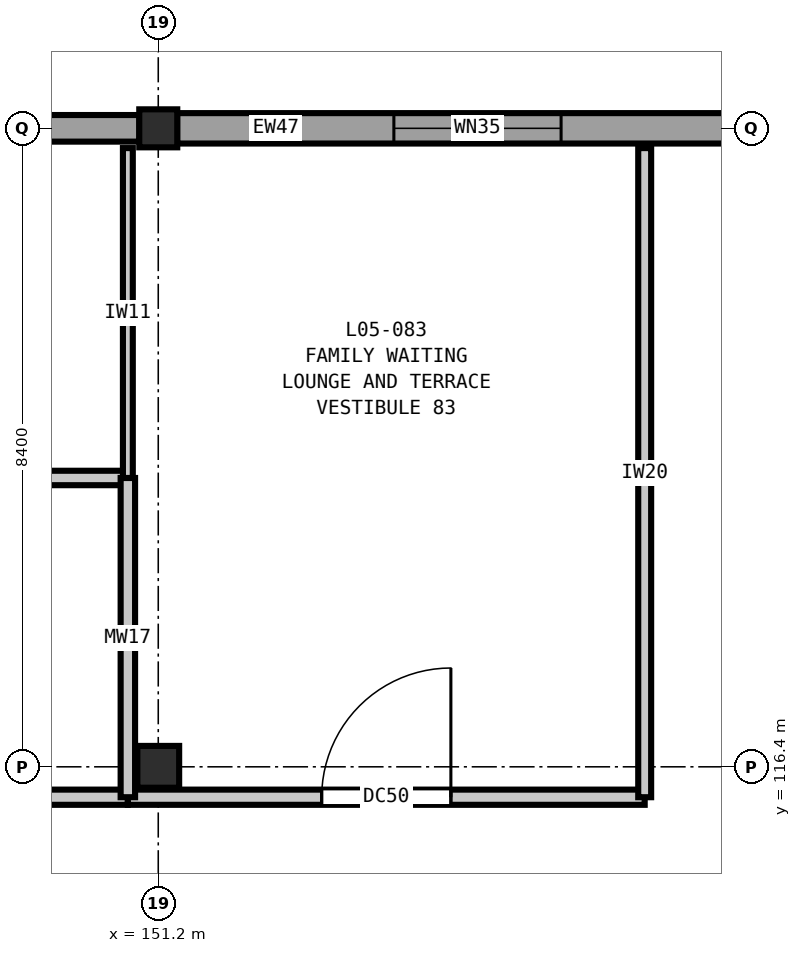
"""IFC4 building model, lengths in metres.
Left out: names, types, materials, properties, quantities, classifications, styles, units other than length and angle.
Written with IfcOpenShell. Run it as: python <this file> out.ifc"""

import sys

from ifc_helpers import new_model, si_unit, direction, frame, frame_2d, origin, origin_2d, place, context, subcontext, project, spatial, rectangle, extrude, element, fill, save


model = new_model("IFC4")
c1 = context("Model", 3, precision=1e-05, world=origin(), true_north=direction((0.0, 1.0)))
c2 = subcontext(c1, "Body", "Model", "MODEL_VIEW")
j1 = project(units=[si_unit("LENGTHUNIT", "METRE"), si_unit("PLANEANGLEUNIT", "RADIAN")], contexts=[c1])
p1 = place(None, origin())
s1 = spatial("IfcSite", under=j1, at=p1, CompositionType="ELEMENT")
p2 = place(p1, origin())
s2 = spatial("IfcBuilding", under=s1, at=p2, CompositionType="ELEMENT")
p3 = place(p2, frame((0.0, 0.0, 24.6)))
s3 = spatial("IfcBuildingStorey", under=s2, at=p3, CompositionType="ELEMENT", Elevation=24.6)
p4 = place(p3, frame((151.2, 116.4, 0.0), z_axis=(0.0, 0.0, 1.0), x_axis=(1.0, 0.0, 0.0)))
e1 = element("IfcColumn", 1, at=p4, inside=s3, PredefinedType="COLUMN", context=c2, shape_type="SweptSolid", body=[
    extrude(rectangle(XDim=0.55, YDim=0.55, at=origin_2d()), origin(), (0.0, 0.0, 1.0), 4.2),
])
p5 = place(p3, frame((151.2, 124.8, 0.0), z_axis=(0.0, 0.0, 1.0), x_axis=(1.0, 0.0, 0.0)))
e2 = element("IfcColumn", 2, at=p5, inside=s3, PredefinedType="COLUMN", context=c2, shape_type="SweptSolid", body=[
    extrude(rectangle(XDim=0.5, YDim=0.5, at=origin_2d()), origin(), (0.0, 0.0, 1.0), 4.2),
])
p6 = place(p3, frame((143.048, 124.8, 0.0), z_axis=(0.0, 0.0, 1.0), x_axis=(1.0, 0.0, 0.0)))
e3 = element("IfcWall", 3, at=p6, inside=s3, PredefinedType="SOLIDWALL", context=c2, shape_type="SweptSolid", body=[
    extrude(rectangle(XDim=7.904, YDim=0.35, at=frame_2d((3.952, 0.0))), origin(), (0.0, 0.0, 1.0), 3.48),
])
p7 = place(p6, frame((2.952, 0.0, 0.9)))
e4 = element("IfcOpeningElement", 4, at=p7, cuts=e3, PredefinedType="OPENING", context=c2, shape_type="SweptSolid", body=[
    extrude(rectangle(XDim=2.0, YDim=1.95, at=frame_2d((1.0, 0.975))), frame((0.0, 0.185, 0.0), z_axis=(0.0, -1.0, 0.0), x_axis=(1.0, 0.0, 0.0)), (0.0, 0.0, 1.0), 0.37),
])
p8 = place(p3, frame((151.448, 124.8, 0.0), z_axis=(0.0, 0.0, 1.0), x_axis=(1.0, 0.0, 0.0)))
e5 = element("IfcWall", 5, at=p8, inside=s3, PredefinedType="SOLIDWALL", context=c2, shape_type="SweptSolid", body=[
    extrude(rectangle(XDim=7.904, YDim=0.4, at=frame_2d((3.952, 0.0))), origin(), (0.0, 0.0, 1.0), 3.48),
])
p9 = place(p8, frame((2.852, 0.0, 0.9)))
e6 = element("IfcOpeningElement", 6, at=p9, cuts=e5, PredefinedType="OPENING", context=c2, shape_type="SweptSolid", body=[
    extrude(rectangle(XDim=2.2, YDim=1.95, at=frame_2d((1.1, 0.975))), frame((0.0, 0.21, 0.0), z_axis=(0.0, -1.0, 0.0), x_axis=(1.0, 0.0, 0.0)), (0.0, 0.0, 1.0), 0.42),
])
p10 = place(p3, frame((143.2, 116.0, 0.0), z_axis=(0.0, 0.0, 1.0), x_axis=(1.0, 0.0, 0.0)))
e7 = element("IfcWall", 7, at=p10, inside=s3, PredefinedType="PARTITIONING", context=c2, shape_type="SweptSolid", body=[
    extrude(rectangle(XDim=7.6, YDim=0.2, at=frame_2d((3.8, 0.0))), origin(), (0.0, 0.0, 1.0), 3.92),
])
p11 = place(p10, frame((3.28, 0.0, 0.0)))
e8 = element("IfcOpeningElement", 8, at=p11, cuts=e7, PredefinedType="OPENING", context=c2, shape_type="SweptSolid", body=[
    extrude(rectangle(XDim=1.04, YDim=2.1, at=frame_2d((0.52, 1.05))), frame((0.0, 0.11, 0.0), z_axis=(0.0, -1.0, 0.0), x_axis=(1.0, 0.0, 0.0)), (0.0, 0.0, 1.0), 0.22),
])
p12 = place(p3, frame((150.8, 116.0, 0.0), z_axis=(0.0, 0.0, 1.0), x_axis=(1.0, 0.0, 0.0)))
e9 = element("IfcWall", 9, at=p12, inside=s3, PredefinedType="PARTITIONING", context=c2, shape_type="SweptSolid", body=[
    extrude(rectangle(XDim=6.8, YDim=0.2, at=frame_2d((3.4, 0.0))), origin(), (0.0, 0.0, 1.0), 3.92),
])
p13 = place(p12, frame((2.55, 0.0, 0.0)))
e10 = element("IfcOpeningElement", 10, at=p13, cuts=e9, PredefinedType="OPENING", context=c2, shape_type="SweptSolid", body=[
    extrude(rectangle(XDim=1.7, YDim=2.3, at=frame_2d((0.85, 1.15))), frame((0.0, 0.11, 0.0), z_axis=(0.0, -1.0, 0.0), x_axis=(1.0, 0.0, 0.0)), (0.0, 0.0, 1.0), 0.22),
])
p14 = place(p3, frame((143.2, 120.2, 0.0), z_axis=(0.0, 0.0, 1.0), x_axis=(1.0, 0.0, 0.0)))
e11 = element("IfcWall", 11, at=p14, inside=s3, PredefinedType="PLUMBINGWALL", context=c2, shape_type="SweptSolid", body=[
    extrude(rectangle(XDim=7.6, YDim=0.19, at=frame_2d((3.8, 0.0))), origin(), (0.0, 0.0, 1.0), 3.92),
])
p15 = place(p3, frame((150.8, 116.0, 0.0), z_axis=(0.0, 0.0, 1.0), x_axis=(0.0, 1.0, 0.0)))
e12 = element("IfcWall", 12, at=p15, inside=s3, PredefinedType="PLUMBINGWALL", context=c2, shape_type="SweptSolid", body=[
    extrude(rectangle(XDim=4.2, YDim=0.19, at=frame_2d((2.1, 0.0))), origin(), (0.0, 0.0, 1.0), 3.92),
])
p16 = place(p3, frame((150.8, 120.2, 0.0), z_axis=(0.0, 0.0, 1.0), x_axis=(0.0, 1.0, 0.0)))
e13 = element("IfcWall", 13, at=p16, inside=s3, PredefinedType="PARTITIONING", context=c2, shape_type="SweptSolid", body=[
    extrude(rectangle(XDim=4.34, YDim=0.13, at=frame_2d((2.17, 0.0))), origin(), (0.0, 0.0, 1.0), 3.92),
])
p17 = place(p3, frame((157.6, 116.0, 0.0), z_axis=(0.0, 0.0, 1.0), x_axis=(0.0, 1.0, 0.0)))
e14 = element("IfcWall", 14, at=p17, inside=s3, PredefinedType="PARTITIONING", context=c2, shape_type="SweptSolid", body=[
    extrude(rectangle(XDim=8.54, YDim=0.17, at=frame_2d((4.27, 0.0))), origin(), (0.0, 0.0, 1.0), 3.92),
])
p18 = place(p9, origin())
e15 = element("IfcWindow", 15, at=p18, inside=s3, PartitioningType="DOUBLE_PANEL_VERTICAL", PredefinedType="WINDOW", context=c2, shape_type="SweptSolid", body=[
    extrude(rectangle(XDim=2.2, YDim=1.95, at=frame_2d((1.1, 0.975))), frame((0.0, 0.03, 0.0), z_axis=(0.0, -1.0, 0.0), x_axis=(1.0, 0.0, 0.0)), (0.0, 0.0, 1.0), 0.06),
])
fill(e6, e15)
p19 = place(p13, origin())
e16 = element("IfcDoor", 16, at=p19, inside=s3, OperationType="SINGLE_SWING_RIGHT", PredefinedType="DOOR", context=c2, shape_type="SweptSolid", body=[
    extrude(rectangle(XDim=1.7, YDim=2.3, at=frame_2d((0.85, 1.15))), frame((0.0, 0.025, 0.0), z_axis=(0.0, -1.0, 0.0), x_axis=(1.0, 0.0, 0.0)), (0.0, 0.0, 1.0), 0.05),
])
fill(e10, e16)
save(model, sys.argv[1])
